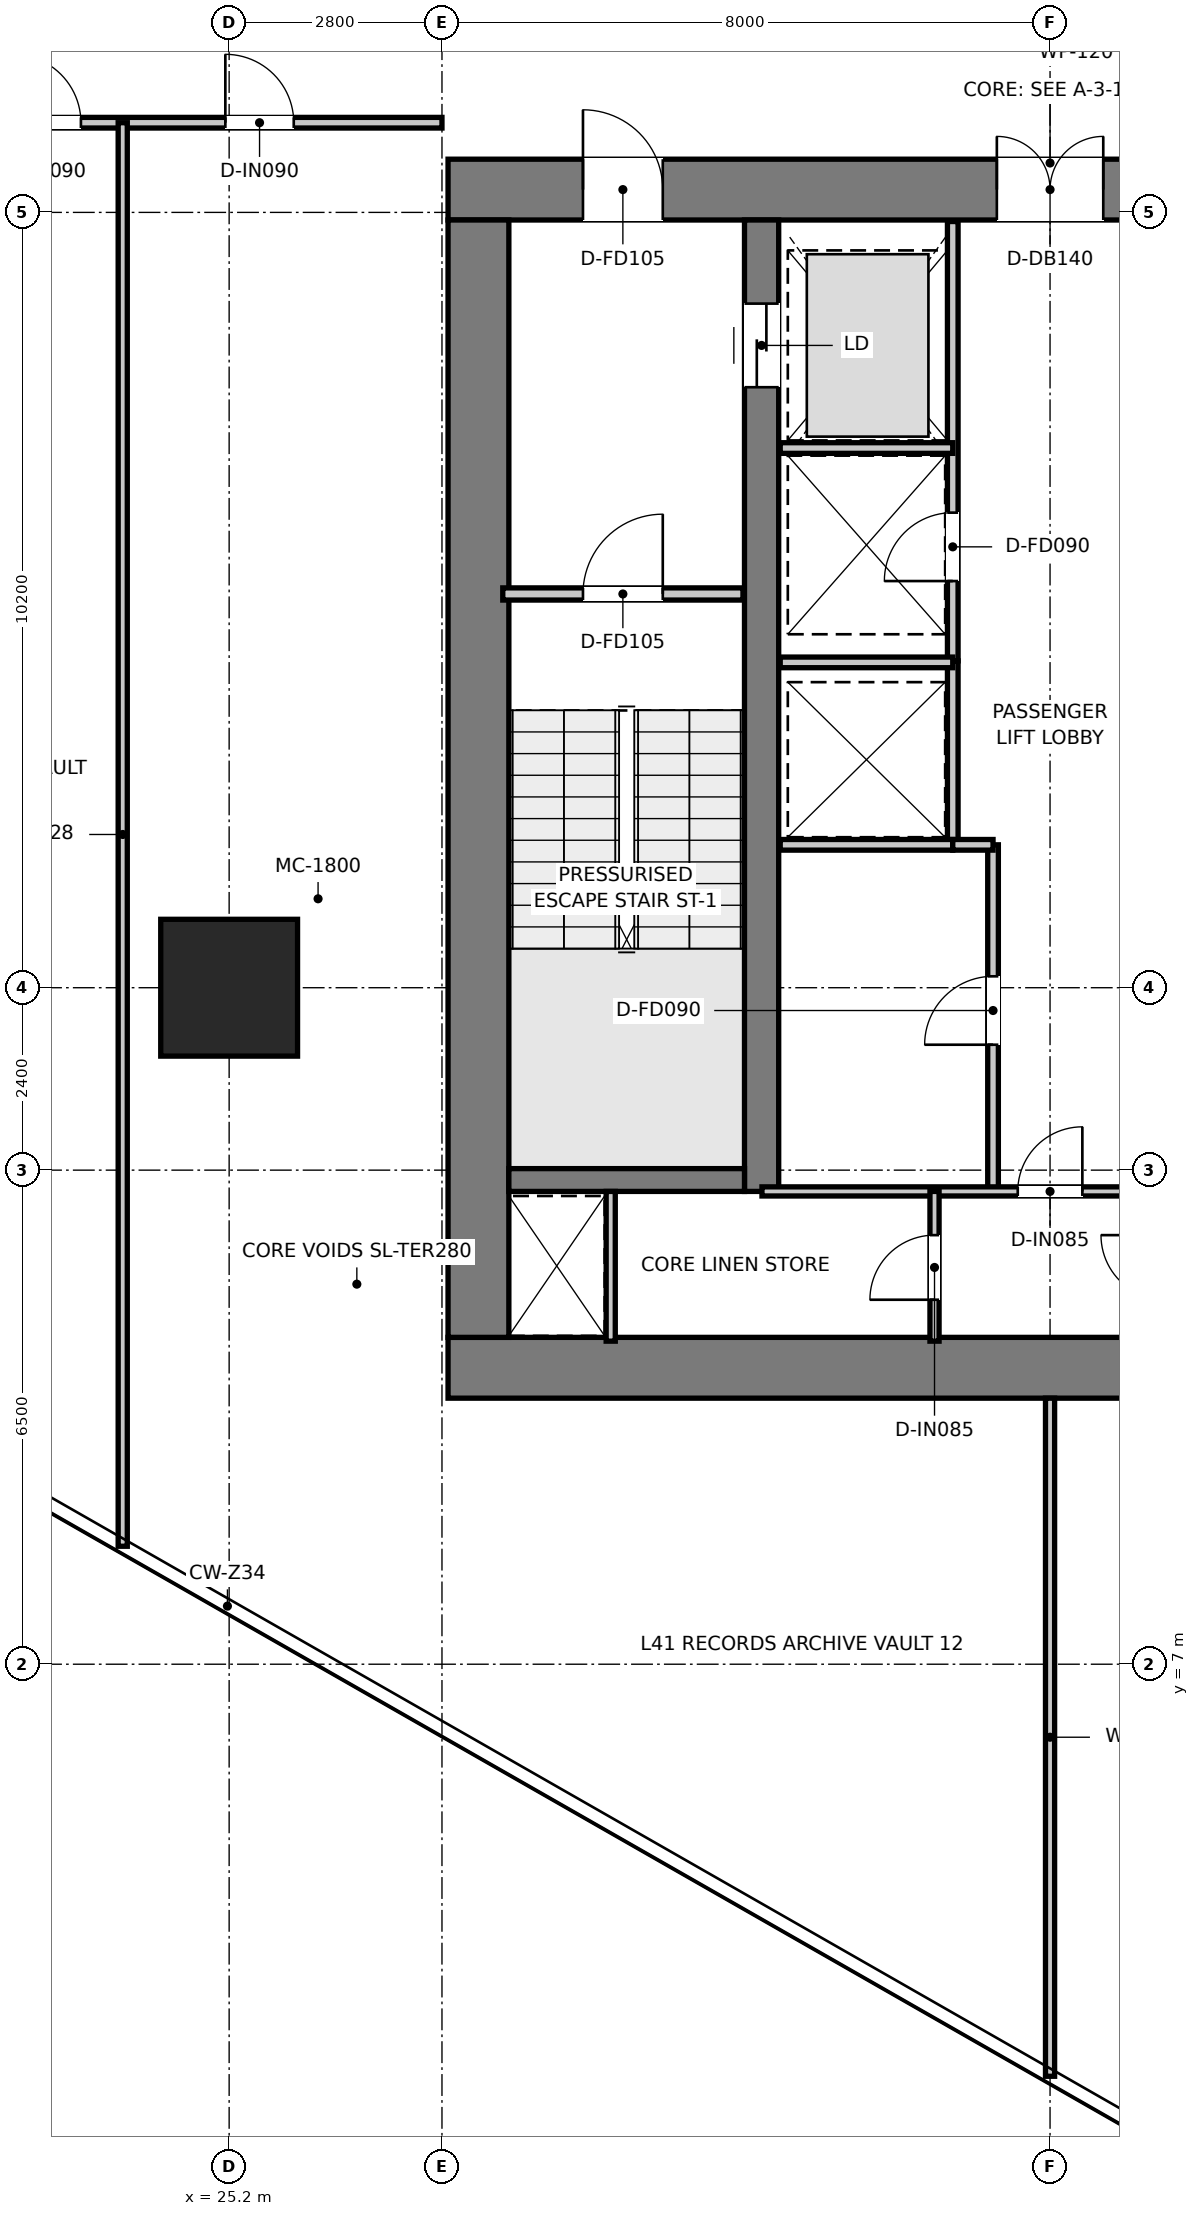
"""IFC4 building model, lengths in metres.
Left out: names, types, materials, properties, quantities, classifications, styles, units other than length and angle.
Written with IfcOpenShell. Run it as: python <this file> out.ifc"""

import sys

from ifc_helpers import new_model, si_unit, direction, frame, frame_2d, origin, origin_2d, place, context, subcontext, project, spatial, rectangle, extrude, source, transform, mapped, element, fill, save


model = new_model("IFC4")
c1 = context("Model", 3, precision=1e-05, world=origin(), true_north=direction((0.0, 1.0)))
c2 = subcontext(c1, "Body", "Model", "MODEL_VIEW")
j1 = project(units=[si_unit("LENGTHUNIT", "METRE"), si_unit("PLANEANGLEUNIT", "RADIAN")], contexts=[c1])
p1 = place(None, origin())
s1 = spatial("IfcSite", under=j1, at=p1, CompositionType="ELEMENT")
p2 = place(p1, origin())
s2 = spatial("IfcBuilding", under=s1, at=p2, CompositionType="ELEMENT")
p3 = place(p2, frame((0.0, 0.0, 169.9)))
s3 = spatial("IfcBuildingStorey", under=s2, at=p3, CompositionType="ELEMENT", Elevation=169.9)
p4 = place(p3, frame((28.08, 10.9, 0.0), z_axis=(0.0, 0.0, 1.0), x_axis=(1.0, 0.0, 0.0)))
e1 = element("IfcWall", 1, at=p4, inside=s3, PredefinedType="SHEAR", context=c2, shape_type="SweptSolid", body=[
    extrude(rectangle(XDim=15.84, YDim=0.8, at=frame_2d((7.92, 0.0))), origin(), (0.0, 0.0, 1.0), 3.95),
])
p5 = place(p3, frame((28.08, 26.4, 0.0), z_axis=(0.0, 0.0, 1.0), x_axis=(1.0, 0.0, 0.0)))
e2 = element("IfcWall", 2, at=p5, inside=s3, PredefinedType="SHEAR", context=c2, shape_type="SweptSolid", body=[
    extrude(rectangle(XDim=15.84, YDim=0.8, at=frame_2d((7.92, 0.0))), origin(), (0.0, 0.0, 1.0), 3.95),
])
p6 = place(p5, frame((7.22, 0.0, 0.0)))
e3 = element("IfcOpeningElement", 3, at=p6, cuts=e2, PredefinedType="OPENING", context=c2, shape_type="SweptSolid", body=[
    extrude(rectangle(XDim=1.4, YDim=2.2, at=frame_2d((0.7, 1.1))), frame((0.0, 0.41, 0.0), z_axis=(0.0, -1.0, 0.0), x_axis=(1.0, 0.0, 0.0)), (0.0, 0.0, 1.0), 0.82),
])
p7 = place(p5, frame((1.775, 0.0, 0.0)))
e4 = element("IfcOpeningElement", 4, at=p7, cuts=e2, PredefinedType="OPENING", context=c2, shape_type="SweptSolid", body=[
    extrude(rectangle(XDim=1.05, YDim=2.1, at=frame_2d((0.525, 1.05))), frame((0.0, 0.41, 0.0), z_axis=(0.0, -1.0, 0.0), x_axis=(1.0, 0.0, 0.0)), (0.0, 0.0, 1.0), 0.82),
])
p8 = place(p5, frame((13.015, 0.0, 0.0)))
e5 = element("IfcOpeningElement", 5, at=p8, cuts=e2, PredefinedType="OPENING", context=c2, shape_type="SweptSolid", body=[
    extrude(rectangle(XDim=1.05, YDim=2.1, at=frame_2d((0.525, 1.05))), frame((0.0, 0.41, 0.0), z_axis=(0.0, -1.0, 0.0), x_axis=(1.0, 0.0, 0.0)), (0.0, 0.0, 1.0), 0.82),
])
p9 = place(p3, frame((28.48, 11.3, 0.0), z_axis=(0.0, 0.0, 1.0), x_axis=(0.0, 1.0, 0.0)))
e6 = element("IfcWall", 6, at=p9, inside=s3, PredefinedType="SHEAR", context=c2, shape_type="SweptSolid", body=[
    extrude(rectangle(XDim=14.7, YDim=0.8, at=frame_2d((7.35, 0.0))), origin(), (0.0, 0.0, 1.0), 3.95),
])
p10 = place(p3, frame((32.205, 13.22, 0.0), z_axis=(0.0, 0.0, 1.0), x_axis=(0.0, 1.0, 0.0)))
e7 = element("IfcWall", 7, at=p10, inside=s3, PredefinedType="SHEAR", context=c2, shape_type="SweptSolid", body=[
    extrude(rectangle(XDim=12.78, YDim=0.45, at=frame_2d((6.39, 0.0))), origin(), (0.0, 0.0, 1.0), 3.95),
])
p11 = place(p10, frame((10.58, 0.0, 0.0)))
e8 = element("IfcOpeningElement", 8, at=p11, cuts=e7, PredefinedType="OPENING", context=c2, shape_type="SweptSolid", body=[
    extrude(rectangle(XDim=1.1, YDim=2.15, at=frame_2d((0.55, 1.075))), frame((0.0, 0.235, 0.0), z_axis=(0.0, -1.0, 0.0), x_axis=(1.0, 0.0, 0.0)), (0.0, 0.0, 1.0), 0.47),
])
p12 = place(p3, frame((28.88, 13.37, 0.0), z_axis=(0.0, 0.0, 1.0), x_axis=(1.0, 0.0, 0.0)))
e9 = element("IfcWall", 9, at=p12, inside=s3, PredefinedType="SHEAR", context=c2, shape_type="SweptSolid", body=[
    extrude(rectangle(XDim=3.1, YDim=0.3, at=frame_2d((1.55, 0.0))), origin(), (0.0, 0.0, 1.0), 3.95),
])
m1 = source(origin(), c2, "Body", "SweptSolid", [
    extrude(rectangle(XDim=1.8, YDim=1.8, at=origin_2d()), origin(), (0.0, 0.0, 1.0), 3.95),
])
p13 = place(p3, frame((25.2, 15.9, 0.0), z_axis=(0.0, 0.0, 1.0), x_axis=(1.0, 0.0, 0.0)))
e10 = element("IfcColumn", 10, at=p13, inside=s3, PredefinedType="USERDEFINED", context=c2, shape_type="MappedRepresentation", body=[
    mapped(m1, transform((0.0, 0.0, 0.0), x_axis=(1.0, 0.0, 0.0), y_axis=(0.0, 1.0, 0.0), z_axis=(0.0, 0.0, 1.0), scale=1.0)),
])
p14 = place(p3, frame((28.8, 21.08, 0.0), z_axis=(0.0, 0.0, 1.0), x_axis=(1.0, 0.0, 0.0)))
e11 = element("IfcWall", 11, at=p14, inside=s3, PredefinedType="PARTITIONING", context=c2, shape_type="SweptSolid", body=[
    extrude(rectangle(XDim=3.16, YDim=0.16, at=frame_2d((1.58, 0.0))), origin(), (0.0, 0.0, 1.0), 3.67),
])
p15 = place(p14, frame((1.055, 0.0, 0.0)))
e12 = element("IfcOpeningElement", 12, at=p15, cuts=e11, PredefinedType="OPENING", context=c2, shape_type="SweptSolid", body=[
    extrude(rectangle(XDim=1.05, YDim=2.1, at=frame_2d((0.525, 1.05))), frame((0.0, 0.09, 0.0), z_axis=(0.0, -1.0, 0.0), x_axis=(1.0, 0.0, 0.0)), (0.0, 0.0, 1.0), 0.18),
])
p16 = place(p3, frame((34.72, 20.2, 0.0), z_axis=(0.0, 0.0, 1.0), x_axis=(0.0, 1.0, 0.0)))
e13 = element("IfcWall", 13, at=p16, inside=s3, PredefinedType="PARTITIONING", context=c2, shape_type="SweptSolid", body=[
    extrude(rectangle(XDim=5.78, YDim=0.14, at=frame_2d((2.89, 0.0))), origin(), (0.0, 0.0, 1.0), 2.67),
])
p17 = place(p16, frame((1.05, 0.0, 0.0)))
e14 = element("IfcOpeningElement", 14, at=p17, cuts=e13, PredefinedType="OPENING", context=c2, shape_type="SweptSolid", body=[
    extrude(rectangle(XDim=0.9, YDim=2.1, at=frame_2d((0.45, 1.05))), frame((0.0, 0.08, 0.0), z_axis=(0.0, -1.0, 0.0), x_axis=(1.0, 0.0, 0.0)), (0.0, 0.0, 1.0), 0.16),
])
p18 = place(p3, frame((32.45, 23.0, 0.0), z_axis=(0.0, 0.0, 1.0), x_axis=(1.0, 0.0, 0.0)))
e15 = element("IfcWall", 15, at=p18, inside=s3, PredefinedType="PARTITIONING", context=c2, shape_type="SweptSolid", body=[
    extrude(rectangle(XDim=2.27, YDim=0.14, at=frame_2d((1.135, 0.0))), origin(), (0.0, 0.0, 1.0), 2.67),
])
p19 = place(p3, frame((34.72, 17.78, 0.0), z_axis=(0.0, 0.0, 1.0), x_axis=(0.0, 1.0, 0.0)))
e16 = element("IfcWall", 16, at=p19, inside=s3, PredefinedType="PARTITIONING", context=c2, shape_type="SweptSolid", body=[
    extrude(rectangle(XDim=2.42, YDim=0.14, at=frame_2d((1.21, 0.0))), origin(), (0.0, 0.0, 1.0), 3.67),
])
for number, where, z_axis, x_axis in (
    (17, (32.45, 17.78, 0.0), (0.0, 0.0, 1.0), (1.0, 0.0, 0.0)),
    (18, (32.45, 20.18, 0.0), (0.0, 0.0, 1.0), (1.0, 0.0, 0.0)),
):
    element("IfcWall", number, at=place(p3, frame(where, z_axis=z_axis, x_axis=x_axis)), inside=s3, PredefinedType="PARTITIONING", context=c2, shape_type="SweptSolid", body=[
        extrude(rectangle(XDim=2.27, YDim=0.14, at=frame_2d((1.135, 0.0))), origin(), (0.0, 0.0, 1.0), 3.67),
    ])
p20 = place(p3, frame((35.25, 13.22, 0.0), z_axis=(0.0, 0.0, 1.0), x_axis=(0.0, 1.0, 0.0)))
e19 = element("IfcWall", 19, at=p20, inside=s3, PredefinedType="PARTITIONING", context=c2, shape_type="SweptSolid", body=[
    extrude(rectangle(XDim=4.56, YDim=0.14, at=frame_2d((2.28, 0.0))), origin(), (0.0, 0.0, 1.0), 3.67),
])
p21 = place(p20, frame((1.93, 0.0, 0.0)))
e20 = element("IfcOpeningElement", 20, at=p21, cuts=e19, PredefinedType="OPENING", context=c2, shape_type="SweptSolid", body=[
    extrude(rectangle(XDim=0.9, YDim=2.1, at=frame_2d((0.45, 1.05))), frame((0.0, 0.08, 0.0), z_axis=(0.0, -1.0, 0.0), x_axis=(1.0, 0.0, 0.0)), (0.0, 0.0, 1.0), 0.16),
])
p22 = place(p3, frame((34.72, 17.78, 0.0), z_axis=(0.0, 0.0, 1.0), x_axis=(1.0, 0.0, 0.0)))
e21 = element("IfcWall", 21, at=p22, inside=s3, PredefinedType="PARTITIONING", context=c2, shape_type="SweptSolid", body=[
    extrude(rectangle(XDim=0.53, YDim=0.14, at=frame_2d((0.265, 0.0))), origin(), (0.0, 0.0, 1.0), 3.67),
])
p23 = place(p3, frame((30.22, 11.25, 0.0), z_axis=(0.0, 0.0, 1.0), x_axis=(0.0, 1.0, 0.0)))
e22 = element("IfcWall", 22, at=p23, inside=s3, PredefinedType="PARTITIONING", context=c2, shape_type="SweptSolid", body=[
    extrude(rectangle(XDim=1.97, YDim=0.12, at=frame_2d((0.985, 0.0))), origin(), (0.0, 0.0, 1.0), 3.67),
])
p24 = place(p3, frame((32.21, 13.22, 0.0), z_axis=(0.0, 0.0, 1.0), x_axis=(1.0, 0.0, 0.0)))
e23 = element("IfcWall", 23, at=p24, inside=s3, PredefinedType="PARTITIONING", context=c2, shape_type="SweptSolid", body=[
    extrude(rectangle(XDim=7.58, YDim=0.12, at=frame_2d((3.79, 0.0))), origin(), (0.0, 0.0, 1.0), 3.67),
])
p25 = place(p24, frame((3.365, 0.0, 0.0)))
e24 = element("IfcOpeningElement", 24, at=p25, cuts=e23, PredefinedType="OPENING", context=c2, shape_type="SweptSolid", body=[
    extrude(rectangle(XDim=0.85, YDim=2.1, at=frame_2d((0.425, 1.05))), frame((0.0, 0.07, 0.0), z_axis=(0.0, -1.0, 0.0), x_axis=(1.0, 0.0, 0.0)), (0.0, 0.0, 1.0), 0.14),
])
p26 = place(p3, frame((34.48, 11.25, 0.0), z_axis=(0.0, 0.0, 1.0), x_axis=(0.0, 1.0, 0.0)))
e25 = element("IfcWall", 25, at=p26, inside=s3, PredefinedType="PARTITIONING", context=c2, shape_type="SweptSolid", body=[
    extrude(rectangle(XDim=1.97, YDim=0.12, at=frame_2d((0.985, 0.0))), origin(), (0.0, 0.0, 1.0), 3.67),
])
p27 = place(p26, frame((0.545, 0.0, 0.0)))
e26 = element("IfcOpeningElement", 26, at=p27, cuts=e25, PredefinedType="OPENING", context=c2, shape_type="SweptSolid", body=[
    extrude(rectangle(XDim=0.85, YDim=2.1, at=frame_2d((0.425, 1.05))), frame((0.0, 0.07, 0.0), z_axis=(0.0, -1.0, 0.0), x_axis=(1.0, 0.0, 0.0)), (0.0, 0.0, 1.0), 0.14),
])
p28 = place(p3, frame((11.21, 27.28, 0.0), z_axis=(0.0, 0.0, 1.0), x_axis=(1.0, 0.0, 0.0)))
e27 = element("IfcWall", 27, at=p28, inside=s3, PredefinedType="PARTITIONING", context=c2, shape_type="SweptSolid", body=[
    extrude(rectangle(XDim=16.79, YDim=0.14, at=frame_2d((8.395, 0.0))), origin(), (0.0, 0.0, 1.0), 3.03),
])
p29 = place(p28, frame((2.565, 0.0, 0.0)))
e28 = element("IfcOpeningElement", 28, at=p29, cuts=e27, PredefinedType="OPENING", context=c2, shape_type="SweptSolid", body=[
    extrude(rectangle(XDim=0.9, YDim=2.1, at=frame_2d((0.45, 1.05))), frame((0.0, 0.08, 0.0), z_axis=(0.0, -1.0, 0.0), x_axis=(1.0, 0.0, 0.0)), (0.0, 0.0, 1.0), 0.16),
])
p30 = place(p28, frame((11.139, 0.0, 0.0)))
e29 = element("IfcOpeningElement", 29, at=p30, cuts=e27, PredefinedType="OPENING", context=c2, shape_type="SweptSolid", body=[
    extrude(rectangle(XDim=0.9, YDim=2.1, at=frame_2d((0.45, 1.05))), frame((0.0, 0.08, 0.0), z_axis=(0.0, -1.0, 0.0), x_axis=(1.0, 0.0, 0.0)), (0.0, 0.0, 1.0), 0.16),
])
p31 = place(p28, frame((13.939, 0.0, 0.0)))
e30 = element("IfcOpeningElement", 30, at=p31, cuts=e27, PredefinedType="OPENING", context=c2, shape_type="SweptSolid", body=[
    extrude(rectangle(XDim=0.9, YDim=2.1, at=frame_2d((0.45, 1.05))), frame((0.0, 0.08, 0.0), z_axis=(0.0, -1.0, 0.0), x_axis=(1.0, 0.0, 0.0)), (0.0, 0.0, 1.0), 0.16),
])
p32 = place(p3, frame((36.0, 1.579, 0.0), z_axis=(0.0, 0.0, 1.0), x_axis=(0.0, 1.0, 0.0)))
e31 = element("IfcWall", 31, at=p32, inside=s3, PredefinedType="PARTITIONING", context=c2, shape_type="SweptSolid", body=[
    extrude(rectangle(XDim=8.921, YDim=0.12, at=frame_2d((4.46, 0.0))), origin(), (0.0, 0.0, 1.0), 3.67),
])
p33 = place(p3, frame((23.8, 8.552, 0.0), z_axis=(0.0, 0.0, 1.0), x_axis=(0.0, 1.0, 0.0)))
e32 = element("IfcWall", 32, at=p33, inside=s3, PredefinedType="PARTITIONING", context=c2, shape_type="SweptSolid", body=[
    extrude(rectangle(XDim=18.728, YDim=0.12, at=frame_2d((9.364, 0.0))), origin(), (0.0, 0.0, 1.0), 3.08),
])
p34 = place(p15, origin())
e33 = element("IfcDoor", 33, at=p34, inside=s3, OperationType="SINGLE_SWING_RIGHT", PredefinedType="DOOR", context=c2, shape_type="SweptSolid", body=[
    extrude(rectangle(XDim=1.05, YDim=2.1, at=frame_2d((0.525, 1.05))), frame((0.0, 0.025, 0.0), z_axis=(0.0, -1.0, 0.0), x_axis=(1.0, 0.0, 0.0)), (0.0, 0.0, 1.0), 0.05),
])
fill(e12, e33)
p35 = place(p6, origin())
e34 = element("IfcDoor", 34, at=p35, inside=s3, OperationType="DOUBLE_DOOR_SINGLE_SWING", PredefinedType="DOOR", context=c2, shape_type="SweptSolid", body=[
    extrude(rectangle(XDim=1.4, YDim=2.2, at=frame_2d((0.7, 1.1))), frame((0.0, 0.025, 0.0), z_axis=(0.0, -1.0, 0.0), x_axis=(1.0, 0.0, 0.0)), (0.0, 0.0, 1.0), 0.05),
])
fill(e3, e34)
p36 = place(p7, origin())
e35 = element("IfcDoor", 35, at=p36, inside=s3, OperationType="SINGLE_SWING_LEFT", PredefinedType="DOOR", context=c2, shape_type="SweptSolid", body=[
    extrude(rectangle(XDim=1.05, YDim=2.1, at=frame_2d((0.525, 1.05))), frame((0.0, 0.025, 0.0), z_axis=(0.0, -1.0, 0.0), x_axis=(1.0, 0.0, 0.0)), (0.0, 0.0, 1.0), 0.05),
])
fill(e4, e35)
p37 = place(p11, origin())
e36 = element("IfcDoor", 36, at=p37, inside=s3, OperationType="DOUBLE_DOOR_SLIDING", PredefinedType="DOOR", context=c2, shape_type="SweptSolid", body=[
    extrude(rectangle(XDim=1.1, YDim=2.15, at=frame_2d((0.55, 1.075))), frame((0.0, 0.025, 0.0), z_axis=(0.0, -1.0, 0.0), x_axis=(1.0, 0.0, 0.0)), (0.0, 0.0, 1.0), 0.05),
])
fill(e8, e36)
p38 = place(p17, origin())
e37 = element("IfcDoor", 37, at=p38, inside=s3, OperationType="SINGLE_SWING_LEFT", PredefinedType="DOOR", context=c2, shape_type="SweptSolid", body=[
    extrude(rectangle(XDim=0.9, YDim=2.1, at=frame_2d((0.45, 1.05))), frame((0.0, 0.025, 0.0), z_axis=(0.0, -1.0, 0.0), x_axis=(1.0, 0.0, 0.0)), (0.0, 0.0, 1.0), 0.05),
])
fill(e14, e37)
p39 = place(p21, origin())
e38 = element("IfcDoor", 38, at=p39, inside=s3, OperationType="SINGLE_SWING_LEFT", PredefinedType="DOOR", context=c2, shape_type="SweptSolid", body=[
    extrude(rectangle(XDim=0.9, YDim=2.1, at=frame_2d((0.45, 1.05))), frame((0.0, 0.025, 0.0), z_axis=(0.0, -1.0, 0.0), x_axis=(1.0, 0.0, 0.0)), (0.0, 0.0, 1.0), 0.05),
])
fill(e20, e38)
p40 = place(p25, origin())
e39 = element("IfcDoor", 39, at=p40, inside=s3, OperationType="SINGLE_SWING_RIGHT", PredefinedType="DOOR", context=c2, shape_type="SweptSolid", body=[
    extrude(rectangle(XDim=0.85, YDim=2.1, at=frame_2d((0.425, 1.05))), frame((0.0, 0.025, 0.0), z_axis=(0.0, -1.0, 0.0), x_axis=(1.0, 0.0, 0.0)), (0.0, 0.0, 1.0), 0.05),
])
fill(e24, e39)
p41 = place(p27, origin())
e40 = element("IfcDoor", 40, at=p41, inside=s3, OperationType="SINGLE_SWING_LEFT", PredefinedType="DOOR", context=c2, shape_type="SweptSolid", body=[
    extrude(rectangle(XDim=0.85, YDim=2.1, at=frame_2d((0.425, 1.05))), frame((0.0, 0.025, 0.0), z_axis=(0.0, -1.0, 0.0), x_axis=(1.0, 0.0, 0.0)), (0.0, 0.0, 1.0), 0.05),
])
fill(e26, e40)
p42 = place(p30, origin())
e41 = element("IfcDoor", 41, at=p42, inside=s3, OperationType="SINGLE_SWING_LEFT", PredefinedType="DOOR", context=c2, shape_type="SweptSolid", body=[
    extrude(rectangle(XDim=0.9, YDim=2.1, at=frame_2d((0.45, 1.05))), frame((0.0, 0.025, 0.0), z_axis=(0.0, -1.0, 0.0), x_axis=(1.0, 0.0, 0.0)), (0.0, 0.0, 1.0), 0.05),
])
fill(e29, e41)
p43 = place(p31, origin())
e42 = element("IfcDoor", 42, at=p43, inside=s3, OperationType="SINGLE_SWING_LEFT", PredefinedType="DOOR", context=c2, shape_type="SweptSolid", body=[
    extrude(rectangle(XDim=0.9, YDim=2.1, at=frame_2d((0.45, 1.05))), frame((0.0, 0.025, 0.0), z_axis=(0.0, -1.0, 0.0), x_axis=(1.0, 0.0, 0.0)), (0.0, 0.0, 1.0), 0.05),
])
fill(e30, e42)
save(model, sys.argv[1])
